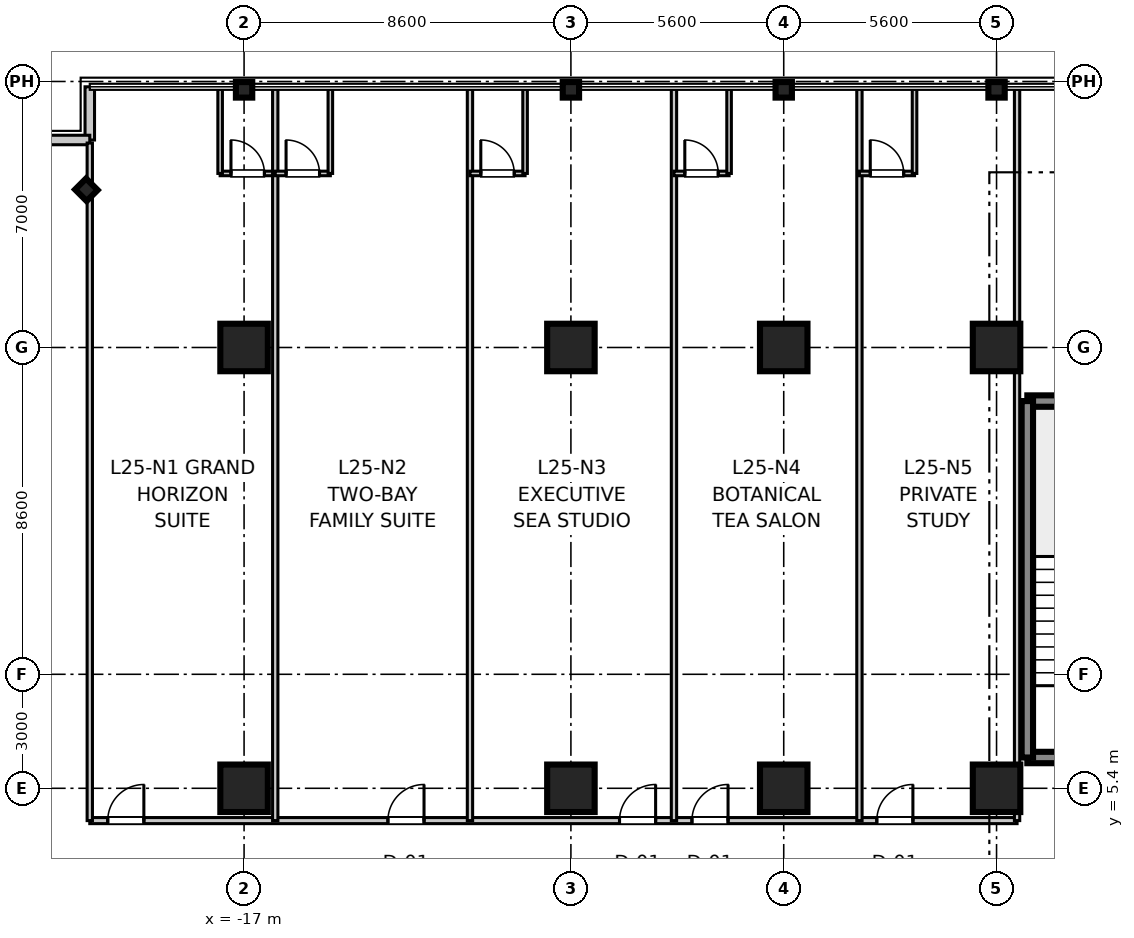
"""IFC4 building model, lengths in metres.
Left out: names, types, materials, properties, quantities, classifications, styles, units other than length and angle.
Written with IfcOpenShell. Run it as: python <this file> out.ifc"""

import sys

from ifc_helpers import new_model, si_unit, direction, frame, frame_2d, origin, origin_2d, place, context, subcontext, project, spatial, rectangle, i_section, extrude, source, transform, mapped, element, fill, save


model = new_model("IFC4")
c1 = context("Model", 3, precision=1e-05, world=origin(), true_north=direction((0.0, 1.0)))
c2 = subcontext(c1, "Body", "Model", "MODEL_VIEW")
j1 = project(units=[si_unit("LENGTHUNIT", "METRE"), si_unit("PLANEANGLEUNIT", "RADIAN")], contexts=[c1])
p1 = place(None, origin())
s1 = spatial("IfcSite", under=j1, at=p1, CompositionType="ELEMENT")
p2 = place(p1, origin())
s2 = spatial("IfcBuilding", under=s1, at=p2, CompositionType="ELEMENT")
p3 = place(p2, frame((0.0, 0.0, 102.9)))
s3 = spatial("IfcBuildingStorey", under=s2, at=p3, CompositionType="ELEMENT", Elevation=102.9)
m1 = source(origin(), c2, "Body", "SweptSolid", [
    extrude(rectangle(XDim=1.25, YDim=1.25, at=origin_2d()), origin(), (0.0, 0.0, 1.0), 3.605),
])
for number, where, z_axis, x_axis in (
    (1, (-17.0, 5.4, 0.0), (0.0, 0.0, 1.0), (1.0, 0.0, 0.0)),
    (2, (-17.0, 17.0, 0.0), (0.0, 0.0, 1.0), (1.0, 0.0, 0.0)),
    (3, (-8.4, 5.4, 0.0), (0.0, 0.0, 1.0), (1.0, 0.0, 0.0)),
    (4, (-8.4, 17.0, 0.0), (0.0, 0.0, 1.0), (1.0, 0.0, 0.0)),
    (5, (-2.8, 5.4, 0.0), (0.0, 0.0, 1.0), (1.0, 0.0, 0.0)),
    (6, (-2.8, 17.0, 0.0), (0.0, 0.0, 1.0), (1.0, 0.0, 0.0)),
    (7, (2.8, 5.4, 0.0), (0.0, 0.0, 1.0), (1.0, 0.0, 0.0)),
    (8, (2.8, 17.0, 0.0), (0.0, 0.0, 1.0), (1.0, 0.0, 0.0)),
):
    element("IfcColumn", number, at=place(p3, frame(where, z_axis=z_axis, x_axis=x_axis)), inside=s3, PredefinedType="COLUMN", context=c2, shape_type="MappedRepresentation", body=[
        mapped(m1, transform((0.0, 0.0, 0.0), scale=1.0)),
    ])
m2 = source(origin(), c2, "Body", "SweptSolid", [
    extrude(i_section(OverallWidth=0.409, OverallDepth=0.43, WebThickness=0.021, FlangeThickness=0.034, at=origin_2d()), origin(), (0.0, 0.0, 1.0), 3.605),
])
for number, where, z_axis, x_axis in (
    (9, (-17.0, 23.78, 0.0), (0.0, 0.0, 1.0), (0.0, 1.0, 0.0)),
    (10, (-8.4, 23.78, 0.0), (0.0, 0.0, 1.0), (0.0, 1.0, 0.0)),
    (11, (-2.8, 23.78, 0.0), (0.0, 0.0, 1.0), (0.0, 1.0, 0.0)),
    (12, (2.8, 23.78, 0.0), (0.0, 0.0, 1.0), (0.0, 1.0, 0.0)),
    (13, (-21.15, 21.15, 0.0), (0.0, 0.0, 1.0), (0.707, 0.707, 0.0)),
):
    element("IfcColumn", number, at=place(p3, frame(where, z_axis=z_axis, x_axis=x_axis)), inside=s3, PredefinedType="COLUMN", context=c2, shape_type="MappedRepresentation", body=[
        mapped(m2, transform((0.0, 0.0, 0.0), scale=1.0)),
    ])
m3 = source(origin(), c2, "Body", "SweptSolid", [
    extrude(rectangle(XDim=3.98, YDim=0.3, at=frame_2d((1.99, 0.0))), origin(), (0.0, 0.0, 1.0), 3.38),
])
for number, where, z_axis, x_axis in (
    (14, (3.61, 6.21, 0.0), (0.0, 0.0, 1.0), (1.0, 0.0, 0.0)),
    (15, (3.61, 15.59, 0.0), (0.0, 0.0, 1.0), (1.0, 0.0, 0.0)),
):
    element("IfcWall", number, at=place(p3, frame(where, z_axis=z_axis, x_axis=x_axis)), inside=s3, PredefinedType="SHEAR", context=c2, shape_type="MappedRepresentation", body=[
        mapped(m3, transform((0.0, 0.0, 0.0), scale=1.0)),
    ])
m4 = source(origin(), c2, "Body", "SweptSolid", [
    extrude(rectangle(XDim=9.38, YDim=0.3, at=frame_2d((4.69, 0.0))), origin(), (0.0, 0.0, 1.0), 3.38),
])
p4 = place(p3, frame((3.61, 6.21, 0.0), z_axis=(0.0, 0.0, 1.0), x_axis=(0.0, 1.0, 0.0)))
e16 = element("IfcWall", 16, at=p4, inside=s3, PredefinedType="SHEAR", context=c2, shape_type="MappedRepresentation", body=[
    mapped(m4, transform((0.0, 0.0, 0.0), scale=1.0)),
])
m5 = source(origin(), c2, "Body", "SweptSolid", [
    extrude(rectangle(XDim=1.4, YDim=0.25, at=frame_2d((0.7, 0.0))), origin(), (0.0, 0.0, 1.0), 3.38),
])
p5 = place(p3, frame((-21.06, 22.46, 0.0), z_axis=(0.0, 0.0, 1.0), x_axis=(0.0, 1.0, 0.0)))
e17 = element("IfcWall", 17, at=p5, inside=s3, PredefinedType="STANDARD", context=c2, shape_type="MappedRepresentation", body=[
    mapped(m5, transform((0.0, 0.0, 0.0), scale=1.0)),
])
m6 = source(origin(), c2, "Body", "SweptSolid", [
    extrude(rectangle(XDim=1.4, YDim=0.25, at=frame_2d((0.7, 0.0))), origin(), (0.0, 0.0, 1.0), 3.38),
])
p6 = place(p3, frame((-22.46, 22.46, 0.0), z_axis=(0.0, 0.0, 1.0), x_axis=(1.0, 0.0, 0.0)))
e18 = element("IfcWall", 18, at=p6, inside=s3, PredefinedType="STANDARD", context=c2, shape_type="MappedRepresentation", body=[
    mapped(m6, transform((0.0, 0.0, 0.0), scale=1.0)),
])
m7 = source(origin(), c2, "Body", "SweptSolid", [
    extrude(rectangle(XDim=24.4, YDim=0.16, at=frame_2d((12.2, 0.0))), origin(), (0.0, 0.0, 1.0), 2.72),
])
p7 = place(p3, frame((-21.06, 4.55, 0.0), z_axis=(0.0, 0.0, 1.0), x_axis=(1.0, 0.0, 0.0)))
e19 = element("IfcWall", 19, at=p7, inside=s3, PredefinedType="PARTITIONING", context=c2, shape_type="MappedRepresentation", body=[
    mapped(m7, transform((0.0, 0.0, 0.0), scale=1.0)),
])
p8 = place(p7, frame((0.473, 0.0, 0.0)))
e20 = element("IfcOpeningElement", 20, at=p8, cuts=e19, PredefinedType="OPENING", context=c2, shape_type="SweptSolid", body=[
    extrude(rectangle(XDim=0.95, YDim=2.1, at=frame_2d((0.475, 1.05))), frame((0.0, 0.09, 0.0), z_axis=(0.0, -1.0, 0.0), x_axis=(1.0, 0.0, 0.0)), (0.0, 0.0, 1.0), 0.18),
])
p9 = place(p7, frame((7.845, 0.0, 0.0)))
e21 = element("IfcOpeningElement", 21, at=p9, cuts=e19, PredefinedType="OPENING", context=c2, shape_type="SweptSolid", body=[
    extrude(rectangle(XDim=0.95, YDim=2.1, at=frame_2d((0.475, 1.05))), frame((0.0, 0.09, 0.0), z_axis=(0.0, -1.0, 0.0), x_axis=(1.0, 0.0, 0.0)), (0.0, 0.0, 1.0), 0.18),
])
p10 = place(p7, frame((13.939, 0.0, 0.0)))
e22 = element("IfcOpeningElement", 22, at=p10, cuts=e19, PredefinedType="OPENING", context=c2, shape_type="SweptSolid", body=[
    extrude(rectangle(XDim=0.95, YDim=2.1, at=frame_2d((0.475, 1.05))), frame((0.0, 0.09, 0.0), z_axis=(0.0, -1.0, 0.0), x_axis=(1.0, 0.0, 0.0)), (0.0, 0.0, 1.0), 0.18),
])
p11 = place(p7, frame((15.845, 0.0, 0.0)))
e23 = element("IfcOpeningElement", 23, at=p11, cuts=e19, PredefinedType="OPENING", context=c2, shape_type="SweptSolid", body=[
    extrude(rectangle(XDim=0.95, YDim=2.1, at=frame_2d((0.475, 1.05))), frame((0.0, 0.09, 0.0), z_axis=(0.0, -1.0, 0.0), x_axis=(1.0, 0.0, 0.0)), (0.0, 0.0, 1.0), 0.18),
])
p12 = place(p7, frame((20.709, 0.0, 0.0)))
e24 = element("IfcOpeningElement", 24, at=p12, cuts=e19, PredefinedType="OPENING", context=c2, shape_type="SweptSolid", body=[
    extrude(rectangle(XDim=0.95, YDim=2.1, at=frame_2d((0.475, 1.05))), frame((0.0, 0.09, 0.0), z_axis=(0.0, -1.0, 0.0), x_axis=(1.0, 0.0, 0.0)), (0.0, 0.0, 1.0), 0.18),
])
m8 = source(origin(), c2, "Body", "SweptSolid", [
    extrude(rectangle(XDim=17.83, YDim=0.14, at=frame_2d((8.915, 0.0))), origin(), (0.0, 0.0, 1.0), 2.72),
])
p13 = place(p3, frame((-21.06, 4.55, 0.0), z_axis=(0.0, 0.0, 1.0), x_axis=(0.0, 1.0, 0.0)))
e25 = element("IfcWall", 25, at=p13, inside=s3, PredefinedType="PARTITIONING", context=c2, shape_type="MappedRepresentation", body=[
    mapped(m8, transform((0.0, 0.0, 0.0), scale=1.0)),
])
m9 = source(origin(), c2, "Body", "SweptSolid", [
    extrude(rectangle(XDim=19.25, YDim=0.14, at=frame_2d((9.625, 0.0))), origin(), (0.0, 0.0, 1.0), 2.72),
])
p14 = place(p3, frame((3.34, 4.55, 0.0), z_axis=(0.0, 0.0, 1.0), x_axis=(0.0, 1.0, 0.0)))
e26 = element("IfcWall", 26, at=p14, inside=s3, PredefinedType="PARTITIONING", context=c2, shape_type="MappedRepresentation", body=[
    mapped(m9, transform((0.0, 0.0, 0.0), scale=1.0)),
])
m10 = source(origin(), c2, "Body", "SweptSolid", [
    extrude(rectangle(XDim=1.45, YDim=0.12, at=frame_2d((0.725, 0.0))), origin(), (0.0, 0.0, 1.0), 2.72),
])
p15 = place(p3, frame((-17.63, 21.58, 0.0), z_axis=(0.0, 0.0, 1.0), x_axis=(1.0, 0.0, 0.0)))
e27 = element("IfcWall", 27, at=p15, inside=s3, PredefinedType="PARTITIONING", context=c2, shape_type="MappedRepresentation", body=[
    mapped(m10, transform((0.0, 0.0, 0.0), scale=1.0)),
])
p16 = place(p15, frame((0.285, 0.0, 0.0)))
e28 = element("IfcOpeningElement", 28, at=p16, cuts=e27, PredefinedType="OPENING", context=c2, shape_type="SweptSolid", body=[
    extrude(rectangle(XDim=0.88, YDim=2.1, at=frame_2d((0.44, 1.05))), frame((0.0, 0.07, 0.0), z_axis=(0.0, -1.0, 0.0), x_axis=(1.0, 0.0, 0.0)), (0.0, 0.0, 1.0), 0.14),
])
m11 = source(origin(), c2, "Body", "SweptSolid", [
    extrude(rectangle(XDim=2.22, YDim=0.12, at=frame_2d((1.11, 0.0))), origin(), (0.0, 0.0, 1.0), 2.72),
])
p17 = place(p3, frame((-17.63, 21.58, 0.0), z_axis=(0.0, 0.0, 1.0), x_axis=(0.0, 1.0, 0.0)))
e29 = element("IfcWall", 29, at=p17, inside=s3, PredefinedType="PARTITIONING", context=c2, shape_type="MappedRepresentation", body=[
    mapped(m11, transform((0.0, 0.0, 0.0), scale=1.0)),
])
p18 = place(p3, frame((-16.18, 4.55, 0.0), z_axis=(0.0, 0.0, 1.0), x_axis=(0.0, 1.0, 0.0)))
e30 = element("IfcWall", 30, at=p18, inside=s3, PredefinedType="PARTITIONING", context=c2, shape_type="MappedRepresentation", body=[
    mapped(m9, transform((0.0, 0.0, 0.0), scale=1.0)),
])
p19 = place(p3, frame((-16.18, 21.58, 0.0), z_axis=(0.0, 0.0, 1.0), x_axis=(1.0, 0.0, 0.0)))
e31 = element("IfcWall", 31, at=p19, inside=s3, PredefinedType="PARTITIONING", context=c2, shape_type="MappedRepresentation", body=[
    mapped(m10, transform((0.0, 0.0, 0.0), scale=1.0)),
])
p20 = place(p19, frame((0.285, 0.0, 0.0)))
e32 = element("IfcOpeningElement", 32, at=p20, cuts=e31, PredefinedType="OPENING", context=c2, shape_type="SweptSolid", body=[
    extrude(rectangle(XDim=0.88, YDim=2.1, at=frame_2d((0.44, 1.05))), frame((0.0, 0.07, 0.0), z_axis=(0.0, -1.0, 0.0), x_axis=(1.0, 0.0, 0.0)), (0.0, 0.0, 1.0), 0.14),
])
p21 = place(p3, frame((-14.73, 21.58, 0.0), z_axis=(0.0, 0.0, 1.0), x_axis=(0.0, 1.0, 0.0)))
e33 = element("IfcWall", 33, at=p21, inside=s3, PredefinedType="PARTITIONING", context=c2, shape_type="MappedRepresentation", body=[
    mapped(m11, transform((0.0, 0.0, 0.0), scale=1.0)),
])
p22 = place(p3, frame((-11.056, 4.55, 0.0), z_axis=(0.0, 0.0, 1.0), x_axis=(0.0, 1.0, 0.0)))
e34 = element("IfcWall", 34, at=p22, inside=s3, PredefinedType="PARTITIONING", context=c2, shape_type="MappedRepresentation", body=[
    mapped(m9, transform((0.0, 0.0, 0.0), scale=1.0)),
])
p23 = place(p3, frame((-11.056, 21.58, 0.0), z_axis=(0.0, 0.0, 1.0), x_axis=(1.0, 0.0, 0.0)))
e35 = element("IfcWall", 35, at=p23, inside=s3, PredefinedType="PARTITIONING", context=c2, shape_type="MappedRepresentation", body=[
    mapped(m10, transform((0.0, 0.0, 0.0), scale=1.0)),
])
p24 = place(p23, frame((0.285, 0.0, 0.0)))
e36 = element("IfcOpeningElement", 36, at=p24, cuts=e35, PredefinedType="OPENING", context=c2, shape_type="SweptSolid", body=[
    extrude(rectangle(XDim=0.88, YDim=2.1, at=frame_2d((0.44, 1.05))), frame((0.0, 0.07, 0.0), z_axis=(0.0, -1.0, 0.0), x_axis=(1.0, 0.0, 0.0)), (0.0, 0.0, 1.0), 0.14),
])
p25 = place(p3, frame((-9.606, 21.58, 0.0), z_axis=(0.0, 0.0, 1.0), x_axis=(0.0, 1.0, 0.0)))
e37 = element("IfcWall", 37, at=p25, inside=s3, PredefinedType="PARTITIONING", context=c2, shape_type="MappedRepresentation", body=[
    mapped(m11, transform((0.0, 0.0, 0.0), scale=1.0)),
])
p26 = place(p3, frame((-5.688, 4.55, 0.0), z_axis=(0.0, 0.0, 1.0), x_axis=(0.0, 1.0, 0.0)))
e38 = element("IfcWall", 38, at=p26, inside=s3, PredefinedType="PARTITIONING", context=c2, shape_type="MappedRepresentation", body=[
    mapped(m9, transform((0.0, 0.0, 0.0), scale=1.0)),
])
p27 = place(p3, frame((-5.688, 21.58, 0.0), z_axis=(0.0, 0.0, 1.0), x_axis=(1.0, 0.0, 0.0)))
e39 = element("IfcWall", 39, at=p27, inside=s3, PredefinedType="PARTITIONING", context=c2, shape_type="MappedRepresentation", body=[
    mapped(m10, transform((0.0, 0.0, 0.0), scale=1.0)),
])
p28 = place(p27, frame((0.285, 0.0, 0.0)))
e40 = element("IfcOpeningElement", 40, at=p28, cuts=e39, PredefinedType="OPENING", context=c2, shape_type="SweptSolid", body=[
    extrude(rectangle(XDim=0.88, YDim=2.1, at=frame_2d((0.44, 1.05))), frame((0.0, 0.07, 0.0), z_axis=(0.0, -1.0, 0.0), x_axis=(1.0, 0.0, 0.0)), (0.0, 0.0, 1.0), 0.14),
])
p29 = place(p3, frame((-4.238, 21.58, 0.0), z_axis=(0.0, 0.0, 1.0), x_axis=(0.0, 1.0, 0.0)))
e41 = element("IfcWall", 41, at=p29, inside=s3, PredefinedType="PARTITIONING", context=c2, shape_type="MappedRepresentation", body=[
    mapped(m11, transform((0.0, 0.0, 0.0), scale=1.0)),
])
p30 = place(p3, frame((-0.808, 4.55, 0.0), z_axis=(0.0, 0.0, 1.0), x_axis=(0.0, 1.0, 0.0)))
e42 = element("IfcWall", 42, at=p30, inside=s3, PredefinedType="PARTITIONING", context=c2, shape_type="MappedRepresentation", body=[
    mapped(m9, transform((0.0, 0.0, 0.0), scale=1.0)),
])
m12 = source(origin(), c2, "Body", "SweptSolid", [
    extrude(rectangle(XDim=1.45, YDim=0.12, at=frame_2d((0.725, 0.0))), origin(), (0.0, 0.0, 1.0), 2.72),
])
p31 = place(p3, frame((-0.808, 21.58, 0.0), z_axis=(0.0, 0.0, 1.0), x_axis=(1.0, 0.0, 0.0)))
e43 = element("IfcWall", 43, at=p31, inside=s3, PredefinedType="PARTITIONING", context=c2, shape_type="MappedRepresentation", body=[
    mapped(m12, transform((0.0, 0.0, 0.0), scale=1.0)),
])
p32 = place(p31, frame((0.285, 0.0, 0.0)))
e44 = element("IfcOpeningElement", 44, at=p32, cuts=e43, PredefinedType="OPENING", context=c2, shape_type="SweptSolid", body=[
    extrude(rectangle(XDim=0.88, YDim=2.1, at=frame_2d((0.44, 1.05))), frame((0.0, 0.07, 0.0), z_axis=(0.0, -1.0, 0.0), x_axis=(1.0, 0.0, 0.0)), (0.0, 0.0, 1.0), 0.14),
])
p33 = place(p3, frame((0.642, 21.58, 0.0), z_axis=(0.0, 0.0, 1.0), x_axis=(0.0, 1.0, 0.0)))
e45 = element("IfcWall", 45, at=p33, inside=s3, PredefinedType="PARTITIONING", context=c2, shape_type="MappedRepresentation", body=[
    mapped(m11, transform((0.0, 0.0, 0.0), scale=1.0)),
])
m13 = source(origin(), c2, "Body", "SweptSolid", [
    extrude(rectangle(XDim=0.88, YDim=2.1, at=frame_2d((0.44, 1.05))), frame((0.0, 0.025, 0.0), z_axis=(0.0, -1.0, 0.0), x_axis=(1.0, 0.0, 0.0)), (0.0, 0.0, 1.0), 0.05),
])
p34 = place(p16, origin())
e46 = element("IfcDoor", 46, at=p34, inside=s3, OperationType="SINGLE_SWING_LEFT", PredefinedType="DOOR", context=c2, shape_type="MappedRepresentation", body=[
    mapped(m13, transform((0.0, 0.0, 0.0), scale=1.0)),
])
fill(e28, e46)
m14 = source(origin(), c2, "Body", "SweptSolid", [
    extrude(rectangle(XDim=0.95, YDim=2.1, at=frame_2d((0.475, 1.05))), frame((0.0, 0.025, 0.0), z_axis=(0.0, -1.0, 0.0), x_axis=(1.0, 0.0, 0.0)), (0.0, 0.0, 1.0), 0.05),
])
p35 = place(p8, origin())
e47 = element("IfcDoor", 47, at=p35, inside=s3, OperationType="SINGLE_SWING_RIGHT", PredefinedType="DOOR", context=c2, shape_type="MappedRepresentation", body=[
    mapped(m14, transform((0.0, 0.0, 0.0), scale=1.0)),
])
fill(e20, e47)
p36 = place(p20, origin())
e48 = element("IfcDoor", 48, at=p36, inside=s3, OperationType="SINGLE_SWING_LEFT", PredefinedType="DOOR", context=c2, shape_type="MappedRepresentation", body=[
    mapped(m13, transform((0.0, 0.0, 0.0), scale=1.0)),
])
fill(e32, e48)
p37 = place(p9, origin())
e49 = element("IfcDoor", 49, at=p37, inside=s3, OperationType="SINGLE_SWING_RIGHT", PredefinedType="DOOR", context=c2, shape_type="MappedRepresentation", body=[
    mapped(m14, transform((0.0, 0.0, 0.0), scale=1.0)),
])
fill(e21, e49)
p38 = place(p24, origin())
e50 = element("IfcDoor", 50, at=p38, inside=s3, OperationType="SINGLE_SWING_LEFT", PredefinedType="DOOR", context=c2, shape_type="MappedRepresentation", body=[
    mapped(m13, transform((0.0, 0.0, 0.0), scale=1.0)),
])
fill(e36, e50)
p39 = place(p10, origin())
e51 = element("IfcDoor", 51, at=p39, inside=s3, OperationType="SINGLE_SWING_RIGHT", PredefinedType="DOOR", context=c2, shape_type="MappedRepresentation", body=[
    mapped(m14, transform((0.0, 0.0, 0.0), scale=1.0)),
])
fill(e22, e51)
p40 = place(p28, origin())
e52 = element("IfcDoor", 52, at=p40, inside=s3, OperationType="SINGLE_SWING_LEFT", PredefinedType="DOOR", context=c2, shape_type="MappedRepresentation", body=[
    mapped(m13, transform((0.0, 0.0, 0.0), scale=1.0)),
])
fill(e40, e52)
p41 = place(p11, origin())
e53 = element("IfcDoor", 53, at=p41, inside=s3, OperationType="SINGLE_SWING_RIGHT", PredefinedType="DOOR", context=c2, shape_type="MappedRepresentation", body=[
    mapped(m14, transform((0.0, 0.0, 0.0), scale=1.0)),
])
fill(e23, e53)
p42 = place(p32, origin())
e54 = element("IfcDoor", 54, at=p42, inside=s3, OperationType="SINGLE_SWING_LEFT", PredefinedType="DOOR", context=c2, shape_type="MappedRepresentation", body=[
    mapped(m13, transform((0.0, 0.0, 0.0), scale=1.0)),
])
fill(e44, e54)
p43 = place(p12, origin())
e55 = element("IfcDoor", 55, at=p43, inside=s3, OperationType="SINGLE_SWING_RIGHT", PredefinedType="DOOR", context=c2, shape_type="MappedRepresentation", body=[
    mapped(m14, transform((0.0, 0.0, 0.0), scale=1.0)),
])
fill(e24, e55)
save(model, sys.argv[1])
